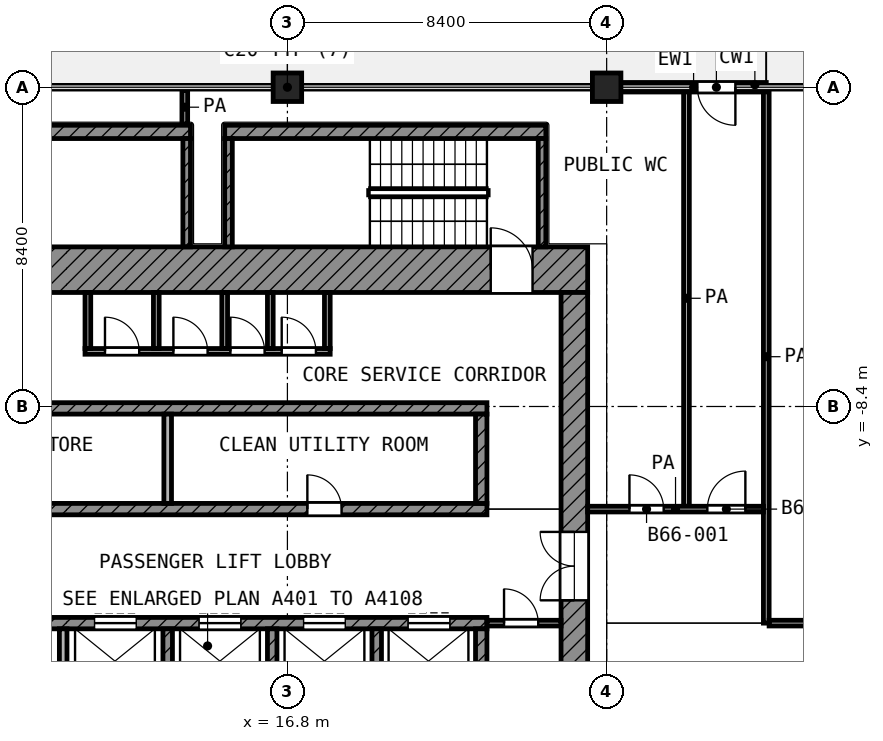
"""IFC4 building model, lengths in metres.
Left out: names, types, materials, properties, quantities, classifications, styles, units other than length and angle.
Written with IfcOpenShell. Run it as: python <this file> out.ifc"""

import sys

from ifc_helpers import new_model, si_unit, direction, frame, frame_2d, origin, origin_2d, place, context, subcontext, project, spatial, rectangle, extrude, element, fill, save


model = new_model("IFC4")
c1 = context("Model", 3, precision=1e-05, world=origin(), true_north=direction((0.0, 1.0)))
c2 = subcontext(c1, "Body", "Model", "MODEL_VIEW")
j1 = project(units=[si_unit("LENGTHUNIT", "METRE"), si_unit("PLANEANGLEUNIT", "RADIAN")], contexts=[c1])
p1 = place(None, origin())
s1 = spatial("IfcSite", under=j1, at=p1, CompositionType="ELEMENT")
p2 = place(p1, origin())
s2 = spatial("IfcBuilding", under=s1, at=p2, CompositionType="ELEMENT")
p3 = place(p2, frame((0.0, 0.0, 286.0)))
s3 = spatial("IfcBuildingStorey", under=s2, at=p3, CompositionType="ELEMENT", Elevation=286.0)
for number, where, z_axis, x_axis in (
    (1, (16.8, 0.0, 0.0), (0.0, 0.0, 1.0), (1.0, 0.0, 0.0)),
    (2, (25.2, 0.0, 0.0), (0.0, 0.0, 1.0), (1.0, 0.0, 0.0)),
):
    element("IfcColumn", number, at=place(p3, frame(where, z_axis=z_axis, x_axis=x_axis)), inside=s3, PredefinedType="COLUMN", context=c2, shape_type="SweptSolid", body=[
        extrude(rectangle(XDim=0.75, YDim=0.75, at=origin_2d()), origin(), (0.0, 0.0, 1.0), 4.2),
    ])
p4 = place(p3, frame((29.4, 0.0, 0.0), z_axis=(0.0, 0.0, 1.0), x_axis=(-1.0, 0.0, 0.0)))
e3 = element("IfcWall", 3, at=p4, inside=s3, PredefinedType="SOLIDWALL", context=c2, shape_type="SweptSolid", body=[
    extrude(rectangle(XDim=3.825, YDim=0.25, at=frame_2d((1.913, 0.0))), origin(), (0.0, 0.0, 1.0), 3.48),
])
p5 = place(p4, frame((0.812, 0.0, 0.0)))
e4 = element("IfcOpeningElement", 4, at=p5, cuts=e3, PredefinedType="OPENING", context=c2, shape_type="SweptSolid", body=[
    extrude(rectangle(XDim=1.0, YDim=2.1, at=frame_2d((0.5, 1.05))), frame((0.0, 0.135, 0.0), z_axis=(0.0, -1.0, 0.0), x_axis=(1.0, 0.0, 0.0)), (0.0, 0.0, 1.0), 0.27),
])
p6 = place(p3, frame((4.2, -4.8, 0.0), z_axis=(0.0, 0.0, 1.0), x_axis=(1.0, 0.0, 0.0)))
e5 = element("IfcWall", 5, at=p6, inside=s3, PredefinedType="SHEAR", context=c2, shape_type="SweptSolid", body=[
    extrude(rectangle(XDim=20.5, YDim=1.2, at=frame_2d((10.25, 0.0))), origin(), (0.0, 0.0, 1.0), 3.6),
])
p7 = place(p6, frame((1.95, 0.0, 0.0)))
e6 = element("IfcOpeningElement", 6, at=p7, cuts=e5, PredefinedType="OPENING", context=c2, shape_type="SweptSolid", body=[
    extrude(rectangle(XDim=1.1, YDim=2.1, at=frame_2d((0.55, 1.05))), frame((0.0, 0.61, 0.0), z_axis=(0.0, -1.0, 0.0), x_axis=(1.0, 0.0, 0.0)), (0.0, 0.0, 1.0), 1.22),
])
p8 = place(p6, frame((17.95, 0.0, 0.0)))
e7 = element("IfcOpeningElement", 7, at=p8, cuts=e5, PredefinedType="OPENING", context=c2, shape_type="SweptSolid", body=[
    extrude(rectangle(XDim=1.1, YDim=2.1, at=frame_2d((0.55, 1.05))), frame((0.0, 0.61, 0.0), z_axis=(0.0, -1.0, 0.0), x_axis=(1.0, 0.0, 0.0)), (0.0, 0.0, 1.0), 1.22),
])
p9 = place(p3, frame((24.35, -24.0, 0.0), z_axis=(0.0, 0.0, 1.0), x_axis=(0.0, 1.0, 0.0)))
e8 = element("IfcWall", 8, at=p9, inside=s3, PredefinedType="SHEAR", context=c2, shape_type="SweptSolid", body=[
    extrude(rectangle(XDim=18.6, YDim=0.7, at=frame_2d((9.3, 0.0))), origin(), (0.0, 0.0, 1.0), 3.6),
])
p10 = place(p9, frame((10.5, 0.0, 0.0)))
e9 = element("IfcOpeningElement", 9, at=p10, cuts=e8, PredefinedType="OPENING", context=c2, shape_type="SweptSolid", body=[
    extrude(rectangle(XDim=1.8, YDim=2.1, at=frame_2d((0.9, 1.05))), frame((0.0, 0.36, 0.0), z_axis=(0.0, -1.0, 0.0), x_axis=(1.0, 0.0, 0.0)), (0.0, 0.0, 1.0), 0.72),
])
p11 = place(p3, frame((5.4, -8.45, 0.0), z_axis=(0.0, 0.0, 1.0), x_axis=(1.0, 0.0, 0.0)))
e10 = element("IfcWall", 10, at=p11, inside=s3, PredefinedType="SHEAR", context=c2, shape_type="SweptSolid", body=[
    extrude(rectangle(XDim=16.65, YDim=0.3, at=frame_2d((8.325, 0.0))), origin(), (0.0, 0.0, 1.0), 3.6),
])
p12 = place(p3, frame((5.4, -11.1, 0.0), z_axis=(0.0, 0.0, 1.0), x_axis=(1.0, 0.0, 0.0)))
e11 = element("IfcWall", 11, at=p12, inside=s3, PredefinedType="SHEAR", context=c2, shape_type="SweptSolid", body=[
    extrude(rectangle(XDim=16.65, YDim=0.3, at=frame_2d((8.325, 0.0))), origin(), (0.0, 0.0, 1.0), 3.6),
])
p13 = place(p12, frame((3.675, 0.0, 0.0)))
e12 = element("IfcOpeningElement", 12, at=p13, cuts=e11, PredefinedType="OPENING", context=c2, shape_type="SweptSolid", body=[
    extrude(rectangle(XDim=0.9, YDim=2.1, at=frame_2d((0.45, 1.05))), frame((0.0, 0.16, 0.0), z_axis=(0.0, -1.0, 0.0), x_axis=(1.0, 0.0, 0.0)), (0.0, 0.0, 1.0), 0.32),
])
p14 = place(p12, frame((11.925, 0.0, 0.0)))
e13 = element("IfcOpeningElement", 13, at=p14, cuts=e11, PredefinedType="OPENING", context=c2, shape_type="SweptSolid", body=[
    extrude(rectangle(XDim=0.9, YDim=2.1, at=frame_2d((0.45, 1.05))), frame((0.0, 0.16, 0.0), z_axis=(0.0, -1.0, 0.0), x_axis=(1.0, 0.0, 0.0)), (0.0, 0.0, 1.0), 0.32),
])
p15 = place(p3, frame((5.4, -14.1, 0.0), z_axis=(0.0, 0.0, 1.0), x_axis=(1.0, 0.0, 0.0)))
e14 = element("IfcWall", 14, at=p15, inside=s3, PredefinedType="SHEAR", context=c2, shape_type="SweptSolid", body=[
    extrude(rectangle(XDim=16.65, YDim=0.3, at=frame_2d((8.325, 0.0))), origin(), (0.0, 0.0, 1.0), 3.6),
])
p16 = place(p15, frame((6.325, 0.0, 0.0)))
e15 = element("IfcOpeningElement", 15, at=p16, cuts=e14, PredefinedType="OPENING", context=c2, shape_type="SweptSolid", body=[
    extrude(rectangle(XDim=1.1, YDim=2.1, at=frame_2d((0.55, 1.05))), frame((0.0, 0.16, 0.0), z_axis=(0.0, -1.0, 0.0), x_axis=(1.0, 0.0, 0.0)), (0.0, 0.0, 1.0), 0.32),
])
p17 = place(p15, frame((9.075, 0.0, 0.0)))
e16 = element("IfcOpeningElement", 16, at=p17, cuts=e14, PredefinedType="OPENING", context=c2, shape_type="SweptSolid", body=[
    extrude(rectangle(XDim=1.1, YDim=2.1, at=frame_2d((0.55, 1.05))), frame((0.0, 0.16, 0.0), z_axis=(0.0, -1.0, 0.0), x_axis=(1.0, 0.0, 0.0)), (0.0, 0.0, 1.0), 0.32),
])
p18 = place(p15, frame((11.825, 0.0, 0.0)))
e17 = element("IfcOpeningElement", 17, at=p18, cuts=e14, PredefinedType="OPENING", context=c2, shape_type="SweptSolid", body=[
    extrude(rectangle(XDim=1.1, YDim=2.1, at=frame_2d((0.55, 1.05))), frame((0.0, 0.16, 0.0), z_axis=(0.0, -1.0, 0.0), x_axis=(1.0, 0.0, 0.0)), (0.0, 0.0, 1.0), 0.32),
])
p19 = place(p15, frame((14.575, 0.0, 0.0)))
e18 = element("IfcOpeningElement", 18, at=p19, cuts=e14, PredefinedType="OPENING", context=c2, shape_type="SweptSolid", body=[
    extrude(rectangle(XDim=1.1, YDim=2.1, at=frame_2d((0.55, 1.05))), frame((0.0, 0.16, 0.0), z_axis=(0.0, -1.0, 0.0), x_axis=(1.0, 0.0, 0.0)), (0.0, 0.0, 1.0), 0.32),
])
p20 = place(p15, frame((2.3, 0.0, 0.0)))
e19 = element("IfcOpeningElement", 19, at=p20, cuts=e14, PredefinedType="OPENING", context=c2, shape_type="SweptSolid", body=[
    extrude(rectangle(XDim=0.9, YDim=2.1, at=frame_2d((0.45, 1.05))), frame((0.0, 0.16, 0.0), z_axis=(0.0, -1.0, 0.0), x_axis=(1.0, 0.0, 0.0)), (0.0, 0.0, 1.0), 0.32),
])
p21 = place(p3, frame((21.9, -10.95, 0.0), z_axis=(0.0, 0.0, 1.0), x_axis=(0.0, 1.0, 0.0)))
e20 = element("IfcWall", 20, at=p21, inside=s3, PredefinedType="SHEAR", context=c2, shape_type="SweptSolid", body=[
    extrude(rectangle(XDim=2.35, YDim=0.3, at=frame_2d((1.175, 0.0))), origin(), (0.0, 0.0, 1.0), 3.6),
])
p22 = place(p3, frame((21.9, -16.6, 0.0), z_axis=(0.0, 0.0, 1.0), x_axis=(0.0, 1.0, 0.0)))
e21 = element("IfcWall", 21, at=p22, inside=s3, PredefinedType="SHEAR", context=c2, shape_type="SweptSolid", body=[
    extrude(rectangle(XDim=2.35, YDim=0.3, at=frame_2d((1.175, 0.0))), origin(), (0.0, 0.0, 1.0), 3.6),
])
p23 = place(p3, frame((13.65, -10.95, 0.0), z_axis=(0.0, 0.0, 1.0), x_axis=(0.0, 1.0, 0.0)))
e22 = element("IfcWall", 22, at=p23, inside=s3, PredefinedType="PARTITIONING", context=c2, shape_type="SweptSolid", body=[
    extrude(rectangle(XDim=2.35, YDim=0.2, at=frame_2d((1.175, 0.0))), origin(), (0.0, 0.0, 1.0), 3.6),
])
p24 = place(p3, frame((10.9, -16.6, 0.0), z_axis=(0.0, 0.0, 1.0), x_axis=(0.0, 1.0, 0.0)))
e23 = element("IfcWall", 23, at=p24, inside=s3, PredefinedType="PARTITIONING", context=c2, shape_type="SweptSolid", body=[
    extrude(rectangle(XDim=2.35, YDim=0.2, at=frame_2d((1.175, 0.0))), origin(), (0.0, 0.0, 1.0), 3.6),
])
for number, where, z_axis, x_axis in (
    (24, (13.65, -16.6, 0.0), (0.0, 0.0, 1.0), (0.0, 1.0, 0.0)),
    (25, (16.4, -16.6, 0.0), (0.0, 0.0, 1.0), (0.0, 1.0, 0.0)),
    (26, (19.15, -16.6, 0.0), (0.0, 0.0, 1.0), (0.0, 1.0, 0.0)),
):
    element("IfcWall", number, at=place(p3, frame(where, z_axis=z_axis, x_axis=x_axis)), inside=s3, PredefinedType="SHEAR", context=c2, shape_type="SweptSolid", body=[
        extrude(rectangle(XDim=2.35, YDim=0.25, at=frame_2d((1.175, 0.0))), origin(), (0.0, 0.0, 1.0), 3.6),
    ])
p25 = place(p3, frame((22.05, -14.1, 0.0), z_axis=(0.0, 0.0, 1.0), x_axis=(1.0, 0.0, 0.0)))
e27 = element("IfcWall", 27, at=p25, inside=s3, PredefinedType="PARTITIONING", context=c2, shape_type="SweptSolid", body=[
    extrude(rectangle(XDim=1.95, YDim=0.15, at=frame_2d((0.975, 0.0))), origin(), (0.0, 0.0, 1.0), 3.6),
])
p26 = place(p25, frame((0.45, 0.0, 0.0)))
e28 = element("IfcOpeningElement", 28, at=p26, cuts=e27, PredefinedType="OPENING", context=c2, shape_type="SweptSolid", body=[
    extrude(rectangle(XDim=0.9, YDim=2.1, at=frame_2d((0.45, 1.05))), frame((0.0, 0.085, 0.0), z_axis=(0.0, -1.0, 0.0), x_axis=(1.0, 0.0, 0.0)), (0.0, 0.0, 1.0), 0.17),
])
p27 = place(p3, frame((11.475, -6.95, 0.0), z_axis=(0.0, 0.0, 1.0), x_axis=(1.0, 0.0, 0.0)))
e29 = element("IfcWall", 29, at=p27, inside=s3, PredefinedType="PARTITIONING", context=c2, shape_type="SweptSolid", body=[
    extrude(rectangle(XDim=6.45, YDim=0.15, at=frame_2d((3.225, 0.0))), origin(), (0.0, 0.0, 1.0), 3.6),
])
p28 = place(p27, frame((0.525, 0.0, 0.0)))
e30 = element("IfcOpeningElement", 30, at=p28, cuts=e29, PredefinedType="OPENING", context=c2, shape_type="SweptSolid", body=[
    extrude(rectangle(XDim=0.9, YDim=2.1, at=frame_2d((0.45, 1.05))), frame((0.0, 0.085, 0.0), z_axis=(0.0, -1.0, 0.0), x_axis=(1.0, 0.0, 0.0)), (0.0, 0.0, 1.0), 0.17),
])
p29 = place(p27, frame((2.325, 0.0, 0.0)))
e31 = element("IfcOpeningElement", 31, at=p29, cuts=e29, PredefinedType="OPENING", context=c2, shape_type="SweptSolid", body=[
    extrude(rectangle(XDim=0.9, YDim=2.1, at=frame_2d((0.45, 1.05))), frame((0.0, 0.085, 0.0), z_axis=(0.0, -1.0, 0.0), x_axis=(1.0, 0.0, 0.0)), (0.0, 0.0, 1.0), 0.17),
])
p30 = place(p27, frame((3.825, 0.0, 0.0)))
e32 = element("IfcOpeningElement", 32, at=p30, cuts=e29, PredefinedType="OPENING", context=c2, shape_type="SweptSolid", body=[
    extrude(rectangle(XDim=0.9, YDim=2.1, at=frame_2d((0.45, 1.05))), frame((0.0, 0.085, 0.0), z_axis=(0.0, -1.0, 0.0), x_axis=(1.0, 0.0, 0.0)), (0.0, 0.0, 1.0), 0.17),
])
p31 = place(p27, frame((5.175, 0.0, 0.0)))
e33 = element("IfcOpeningElement", 33, at=p31, cuts=e29, PredefinedType="OPENING", context=c2, shape_type="SweptSolid", body=[
    extrude(rectangle(XDim=0.9, YDim=2.1, at=frame_2d((0.45, 1.05))), frame((0.0, 0.085, 0.0), z_axis=(0.0, -1.0, 0.0), x_axis=(1.0, 0.0, 0.0)), (0.0, 0.0, 1.0), 0.17),
])
for number, where, z_axis, x_axis in (
    (34, (11.55, -6.875, 0.0), (0.0, 0.0, 1.0), (0.0, 1.0, 0.0)),
    (35, (13.35, -6.875, 0.0), (0.0, 0.0, 1.0), (0.0, 1.0, 0.0)),
    (36, (15.15, -6.875, 0.0), (0.0, 0.0, 1.0), (0.0, 1.0, 0.0)),
    (37, (16.35, -6.875, 0.0), (0.0, 0.0, 1.0), (0.0, 1.0, 0.0)),
    (38, (17.85, -6.875, 0.0), (0.0, 0.0, 1.0), (0.0, 1.0, 0.0)),
):
    element("IfcWall", number, at=place(p3, frame(where, z_axis=z_axis, x_axis=x_axis)), inside=s3, PredefinedType="PARTITIONING", context=c2, shape_type="SweptSolid", body=[
        extrude(rectangle(XDim=1.475, YDim=0.15, at=frame_2d((0.738, 0.0))), origin(), (0.0, 0.0, 1.0), 3.6),
    ])
p32 = place(p3, frame((5.8, -1.175, 0.0), z_axis=(0.0, 0.0, 1.0), x_axis=(1.0, 0.0, 0.0)))
e39 = element("IfcWall", 39, at=p32, inside=s3, PredefinedType="SHEAR", context=c2, shape_type="SweptSolid", body=[
    extrude(rectangle(XDim=8.45, YDim=0.35, at=frame_2d((4.225, 0.0))), origin(), (0.0, 0.0, 1.0), 3.6),
])
p33 = place(p3, frame((14.15, -4.2, 0.0), z_axis=(0.0, 0.0, 1.0), x_axis=(0.0, 1.0, 0.0)))
e40 = element("IfcWall", 40, at=p33, inside=s3, PredefinedType="SHEAR", context=c2, shape_type="SweptSolid", body=[
    extrude(rectangle(XDim=2.85, YDim=0.2, at=frame_2d((1.425, 0.0))), origin(), (0.0, 0.0, 1.0), 3.6),
])
p34 = place(p3, frame((15.15, -1.175, 0.0), z_axis=(0.0, 0.0, 1.0), x_axis=(1.0, 0.0, 0.0)))
e41 = element("IfcWall", 41, at=p34, inside=s3, PredefinedType="SHEAR", context=c2, shape_type="SweptSolid", body=[
    extrude(rectangle(XDim=8.45, YDim=0.35, at=frame_2d((4.225, 0.0))), origin(), (0.0, 0.0, 1.0), 3.6),
])
for number, where, z_axis, x_axis in (
    (42, (15.25, -4.2, 0.0), (0.0, 0.0, 1.0), (0.0, 1.0, 0.0)),
    (43, (23.5, -4.2, 0.0), (0.0, 0.0, 1.0), (0.0, 1.0, 0.0)),
):
    element("IfcWall", number, at=place(p3, frame(where, z_axis=z_axis, x_axis=x_axis)), inside=s3, PredefinedType="SHEAR", context=c2, shape_type="SweptSolid", body=[
        extrude(rectangle(XDim=2.85, YDim=0.2, at=frame_2d((1.425, 0.0))), origin(), (0.0, 0.0, 1.0), 3.6),
    ])
p35 = place(p3, frame((29.475, -14.1, 0.0), z_axis=(0.0, 0.0, 1.0), x_axis=(1.0, 0.0, 0.0)))
e44 = element("IfcWall", 44, at=p35, inside=s3, PredefinedType="PARTITIONING", context=c2, shape_type="SweptSolid", body=[
    extrude(rectangle(XDim=10.807, YDim=0.15, at=frame_2d((5.403, 0.0))), origin(), (0.0, 0.0, 1.0), 3.6),
])
p36 = place(p3, frame((24.7, -11.1, 0.0), z_axis=(0.0, 0.0, 1.0), x_axis=(1.0, 0.0, 0.0)))
e45 = element("IfcWall", 45, at=p36, inside=s3, PredefinedType="PARTITIONING", context=c2, shape_type="SweptSolid", body=[
    extrude(rectangle(XDim=4.625, YDim=0.15, at=frame_2d((2.312, 0.0))), origin(), (0.0, 0.0, 1.0), 3.6),
])
p37 = place(p36, frame((1.1, 0.0, 0.0)))
e46 = element("IfcOpeningElement", 46, at=p37, cuts=e45, PredefinedType="OPENING", context=c2, shape_type="SweptSolid", body=[
    extrude(rectangle(XDim=0.9, YDim=2.1, at=frame_2d((0.45, 1.05))), frame((0.0, 0.085, 0.0), z_axis=(0.0, -1.0, 0.0), x_axis=(1.0, 0.0, 0.0)), (0.0, 0.0, 1.0), 0.17),
])
p38 = place(p36, frame((3.15, 0.0, 0.0)))
e47 = element("IfcOpeningElement", 47, at=p38, cuts=e45, PredefinedType="OPENING", context=c2, shape_type="SweptSolid", body=[
    extrude(rectangle(XDim=1.0, YDim=2.1, at=frame_2d((0.5, 1.05))), frame((0.0, 0.085, 0.0), z_axis=(0.0, -1.0, 0.0), x_axis=(1.0, 0.0, 0.0)), (0.0, 0.0, 1.0), 0.17),
])
p39 = place(p3, frame((14.1, -0.97, 0.0), z_axis=(0.0, 0.0, 1.0), x_axis=(0.0, 1.0, 0.0)))
e48 = element("IfcWall", 48, at=p39, inside=s3, PredefinedType="PARTITIONING", context=c2, shape_type="SweptSolid", body=[
    extrude(rectangle(XDim=0.89, YDim=0.15, at=frame_2d((0.445, 0.0))), origin(), (0.0, 0.0, 1.0), 3.6),
])
p40 = place(p3, frame((27.3, -11.025, 0.0), z_axis=(0.0, 0.0, 1.0), x_axis=(0.0, 1.0, 0.0)))
e49 = element("IfcWall", 49, at=p40, inside=s3, PredefinedType="PARTITIONING", context=c2, shape_type="SweptSolid", body=[
    extrude(rectangle(XDim=10.945, YDim=0.15, at=frame_2d((5.472, 0.0))), origin(), (0.0, 0.0, 1.0), 3.6),
])
p41 = place(p3, frame((29.4, -14.1, 0.0), z_axis=(0.0, 0.0, 1.0), x_axis=(0.0, 1.0, 0.0)))
e50 = element("IfcWall", 50, at=p41, inside=s3, PredefinedType="PARTITIONING", context=c2, shape_type="SweptSolid", body=[
    extrude(rectangle(XDim=14.02, YDim=0.15, at=frame_2d((7.01, 0.0))), origin(), (0.0, 0.0, 1.0), 3.6),
])
p42 = place(p5, origin())
e51 = element("IfcDoor", 51, at=p42, inside=s3, OperationType="SINGLE_SWING_LEFT", PredefinedType="DOOR", context=c2, shape_type="SweptSolid", body=[
    extrude(rectangle(XDim=1.0, YDim=2.1, at=frame_2d((0.5, 1.05))), frame((0.0, 0.025, 0.0), z_axis=(0.0, -1.0, 0.0), x_axis=(1.0, 0.0, 0.0)), (0.0, 0.0, 1.0), 0.05),
])
fill(e4, e51)
p43 = place(p16, origin())
e52 = element("IfcDoor", 52, at=p43, inside=s3, OperationType="DOUBLE_DOOR_SLIDING", PredefinedType="DOOR", context=c2, shape_type="SweptSolid", body=[
    extrude(rectangle(XDim=1.1, YDim=2.1, at=frame_2d((0.55, 1.05))), frame((0.0, 0.025, 0.0), z_axis=(0.0, -1.0, 0.0), x_axis=(1.0, 0.0, 0.0)), (0.0, 0.0, 1.0), 0.05),
])
fill(e15, e52)
p44 = place(p17, origin())
e53 = element("IfcDoor", 53, at=p44, inside=s3, OperationType="DOUBLE_DOOR_SLIDING", PredefinedType="DOOR", context=c2, shape_type="SweptSolid", body=[
    extrude(rectangle(XDim=1.1, YDim=2.1, at=frame_2d((0.55, 1.05))), frame((0.0, 0.025, 0.0), z_axis=(0.0, -1.0, 0.0), x_axis=(1.0, 0.0, 0.0)), (0.0, 0.0, 1.0), 0.05),
])
fill(e16, e53)
p45 = place(p18, origin())
e54 = element("IfcDoor", 54, at=p45, inside=s3, OperationType="DOUBLE_DOOR_SLIDING", PredefinedType="DOOR", context=c2, shape_type="SweptSolid", body=[
    extrude(rectangle(XDim=1.1, YDim=2.1, at=frame_2d((0.55, 1.05))), frame((0.0, 0.025, 0.0), z_axis=(0.0, -1.0, 0.0), x_axis=(1.0, 0.0, 0.0)), (0.0, 0.0, 1.0), 0.05),
])
fill(e17, e54)
p46 = place(p19, origin())
e55 = element("IfcDoor", 55, at=p46, inside=s3, OperationType="DOUBLE_DOOR_SLIDING", PredefinedType="DOOR", context=c2, shape_type="SweptSolid", body=[
    extrude(rectangle(XDim=1.1, YDim=2.1, at=frame_2d((0.55, 1.05))), frame((0.0, 0.025, 0.0), z_axis=(0.0, -1.0, 0.0), x_axis=(1.0, 0.0, 0.0)), (0.0, 0.0, 1.0), 0.05),
])
fill(e18, e55)
p47 = place(p8, origin())
e56 = element("IfcDoor", 56, at=p47, inside=s3, OperationType="SINGLE_SWING_LEFT", PredefinedType="DOOR", context=c2, shape_type="SweptSolid", body=[
    extrude(rectangle(XDim=1.1, YDim=2.1, at=frame_2d((0.55, 1.05))), frame((0.0, 0.025, 0.0), z_axis=(0.0, -1.0, 0.0), x_axis=(1.0, 0.0, 0.0)), (0.0, 0.0, 1.0), 0.05),
])
fill(e7, e56)
p48 = place(p10, origin())
e57 = element("IfcDoor", 57, at=p48, inside=s3, OperationType="DOUBLE_DOOR_SINGLE_SWING", PredefinedType="DOOR", context=c2, shape_type="SweptSolid", body=[
    extrude(rectangle(XDim=1.8, YDim=2.1, at=frame_2d((0.9, 1.05))), frame((0.0, 0.025, 0.0), z_axis=(0.0, -1.0, 0.0), x_axis=(1.0, 0.0, 0.0)), (0.0, 0.0, 1.0), 0.05),
])
fill(e9, e57)
p49 = place(p28, origin())
e58 = element("IfcDoor", 58, at=p49, inside=s3, OperationType="SINGLE_SWING_LEFT", PredefinedType="DOOR", context=c2, shape_type="SweptSolid", body=[
    extrude(rectangle(XDim=0.9, YDim=2.1, at=frame_2d((0.45, 1.05))), frame((0.0, 0.025, 0.0), z_axis=(0.0, -1.0, 0.0), x_axis=(1.0, 0.0, 0.0)), (0.0, 0.0, 1.0), 0.05),
])
fill(e30, e58)
p50 = place(p29, origin())
e59 = element("IfcDoor", 59, at=p50, inside=s3, OperationType="SINGLE_SWING_LEFT", PredefinedType="DOOR", context=c2, shape_type="SweptSolid", body=[
    extrude(rectangle(XDim=0.9, YDim=2.1, at=frame_2d((0.45, 1.05))), frame((0.0, 0.025, 0.0), z_axis=(0.0, -1.0, 0.0), x_axis=(1.0, 0.0, 0.0)), (0.0, 0.0, 1.0), 0.05),
])
fill(e31, e59)
p51 = place(p30, origin())
e60 = element("IfcDoor", 60, at=p51, inside=s3, OperationType="SINGLE_SWING_LEFT", PredefinedType="DOOR", context=c2, shape_type="SweptSolid", body=[
    extrude(rectangle(XDim=0.9, YDim=2.1, at=frame_2d((0.45, 1.05))), frame((0.0, 0.025, 0.0), z_axis=(0.0, -1.0, 0.0), x_axis=(1.0, 0.0, 0.0)), (0.0, 0.0, 1.0), 0.05),
])
fill(e32, e60)
p52 = place(p31, origin())
e61 = element("IfcDoor", 61, at=p52, inside=s3, OperationType="SINGLE_SWING_LEFT", PredefinedType="DOOR", context=c2, shape_type="SweptSolid", body=[
    extrude(rectangle(XDim=0.9, YDim=2.1, at=frame_2d((0.45, 1.05))), frame((0.0, 0.025, 0.0), z_axis=(0.0, -1.0, 0.0), x_axis=(1.0, 0.0, 0.0)), (0.0, 0.0, 1.0), 0.05),
])
fill(e33, e61)
p53 = place(p26, origin())
e62 = element("IfcDoor", 62, at=p53, inside=s3, OperationType="SINGLE_SWING_LEFT", PredefinedType="DOOR", context=c2, shape_type="SweptSolid", body=[
    extrude(rectangle(XDim=0.9, YDim=2.1, at=frame_2d((0.45, 1.05))), frame((0.0, 0.025, 0.0), z_axis=(0.0, -1.0, 0.0), x_axis=(1.0, 0.0, 0.0)), (0.0, 0.0, 1.0), 0.05),
])
fill(e28, e62)
p54 = place(p14, origin())
e63 = element("IfcDoor", 63, at=p54, inside=s3, OperationType="SINGLE_SWING_LEFT", PredefinedType="DOOR", context=c2, shape_type="SweptSolid", body=[
    extrude(rectangle(XDim=0.9, YDim=2.1, at=frame_2d((0.45, 1.05))), frame((0.0, 0.025, 0.0), z_axis=(0.0, -1.0, 0.0), x_axis=(1.0, 0.0, 0.0)), (0.0, 0.0, 1.0), 0.05),
])
fill(e13, e63)
p55 = place(p37, origin())
e64 = element("IfcDoor", 64, at=p55, inside=s3, OperationType="SINGLE_SWING_LEFT", PredefinedType="DOOR", context=c2, shape_type="SweptSolid", body=[
    extrude(rectangle(XDim=0.9, YDim=2.1, at=frame_2d((0.45, 1.05))), frame((0.0, 0.025, 0.0), z_axis=(0.0, -1.0, 0.0), x_axis=(1.0, 0.0, 0.0)), (0.0, 0.0, 1.0), 0.05),
])
fill(e46, e64)
p56 = place(p38, origin())
e65 = element("IfcDoor", 65, at=p56, inside=s3, OperationType="SINGLE_SWING_RIGHT", PredefinedType="DOOR", context=c2, shape_type="SweptSolid", body=[
    extrude(rectangle(XDim=1.0, YDim=2.1, at=frame_2d((0.5, 1.05))), frame((0.0, 0.025, 0.0), z_axis=(0.0, -1.0, 0.0), x_axis=(1.0, 0.0, 0.0)), (0.0, 0.0, 1.0), 0.05),
])
fill(e47, e65)
save(model, sys.argv[1])
